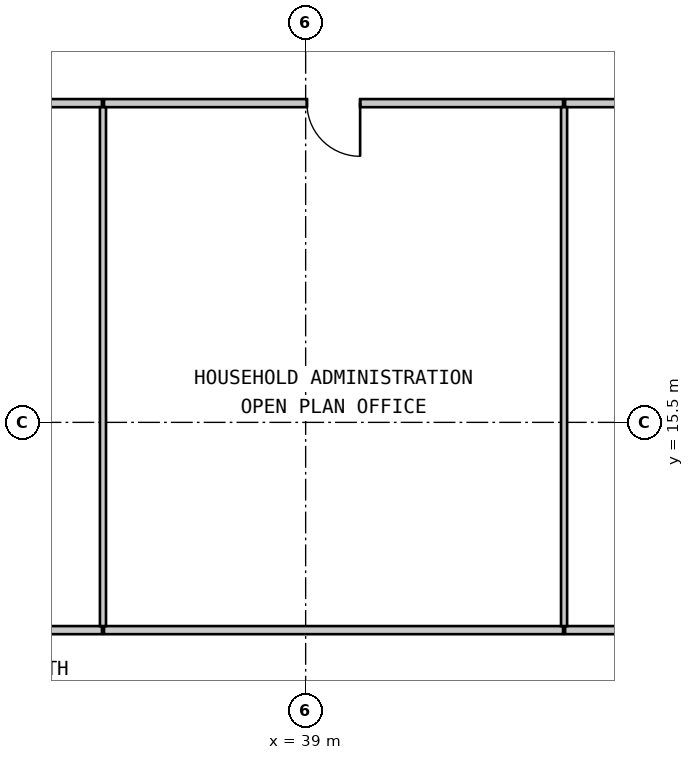
"""IFC4 building model, lengths in metres.
Left out: names, types, materials, properties, quantities, classifications, styles, units other than length and angle.
Written with IfcOpenShell. Run it as: python <this file> out.ifc"""

import sys

from ifc_helpers import new_model, si_unit, direction, frame, frame_2d, origin, place, context, subcontext, project, spatial, rectangle, extrude, source, transform, mapped, element, fill, save


model = new_model("IFC4")
c1 = context("Model", 3, precision=1e-05, world=origin(), true_north=direction((0.0, 1.0)))
c2 = subcontext(c1, "Body", "Model", "MODEL_VIEW")
j1 = project(units=[si_unit("LENGTHUNIT", "METRE"), si_unit("PLANEANGLEUNIT", "RADIAN")], contexts=[c1])
p1 = place(None, origin())
s1 = spatial("IfcSite", under=j1, at=p1, CompositionType="ELEMENT")
p2 = place(p1, origin())
s2 = spatial("IfcBuilding", under=s1, at=p2, CompositionType="ELEMENT")
p3 = place(p2, frame((0.0, 0.0, 68.25)))
s3 = spatial("IfcBuildingStorey", under=s2, at=p3, CompositionType="ELEMENT", Elevation=68.25)
m1 = source(origin(), c2, "Body", "SweptSolid", [
    extrude(rectangle(XDim=9.06, YDim=0.16, at=frame_2d((4.53, 0.0))), origin(), (0.0, 0.0, 1.0), 2.93),
])
p4 = place(p3, frame((34.98, 21.8, 0.0), z_axis=(0.0, 0.0, 1.0), x_axis=(-1.0, 0.0, 0.0)))
e1 = element("IfcWall", 1, at=p4, inside=s3, PredefinedType="PARTITIONING", context=c2, shape_type="MappedRepresentation", body=[
    mapped(m1, transform((0.0, 0.0, 0.0), scale=1.0)),
])
m2 = source(origin(), c2, "Body", "SweptSolid", [
    extrude(rectangle(XDim=1.05, YDim=2.1, at=frame_2d((0.525, 1.05))), frame((0.0, 0.09, 0.0), z_axis=(0.0, -1.0, 0.0), x_axis=(1.0, 0.0, 0.0)), (0.0, 0.0, 1.0), 0.18),
])
p5 = place(p4, frame((4.005, 0.0, 0.0)))
e2 = element("IfcOpeningElement", 2, at=p5, cuts=e1, PredefinedType="OPENING", context=c2, shape_type="MappedRepresentation", body=[
    mapped(m2, transform((0.0, 0.0, 0.0), scale=1.0)),
])
p6 = place(p3, frame((44.08, 21.8, 0.0), z_axis=(0.0, 0.0, 1.0), x_axis=(-1.0, 0.0, 0.0)))
e3 = element("IfcWall", 3, at=p6, inside=s3, PredefinedType="PARTITIONING", context=c2, shape_type="MappedRepresentation", body=[
    mapped(m1, transform((0.0, 0.0, 0.0), scale=1.0)),
])
p7 = place(p6, frame((4.005, 0.0, 0.0)))
e4 = element("IfcOpeningElement", 4, at=p7, cuts=e3, PredefinedType="OPENING", context=c2, shape_type="MappedRepresentation", body=[
    mapped(m2, transform((0.0, 0.0, 0.0), scale=1.0)),
])
for number, where, z_axis, x_axis in (
    (5, (53.18, 21.8, 0.0), (0.0, 0.0, 1.0), (-1.0, 0.0, 0.0)),
    (6, (25.92, 11.4, 0.0), (0.0, 0.0, 1.0), (1.0, 0.0, 0.0)),
    (7, (35.02, 11.4, 0.0), (0.0, 0.0, 1.0), (1.0, 0.0, 0.0)),
):
    element("IfcWall", number, at=place(p3, frame(where, z_axis=z_axis, x_axis=x_axis)), inside=s3, PredefinedType="PARTITIONING", context=c2, shape_type="MappedRepresentation", body=[
        mapped(m1, transform((0.0, 0.0, 0.0), scale=1.0)),
    ])
m3 = source(origin(), c2, "Body", "SweptSolid", [
    extrude(rectangle(XDim=9.0, YDim=0.16, at=frame_2d((4.5, 0.0))), origin(), (0.0, 0.0, 1.0), 2.93),
])
p8 = place(p3, frame((44.12, 11.4, 0.0), z_axis=(0.0, 0.0, 1.0), x_axis=(1.0, 0.0, 0.0)))
e8 = element("IfcWall", 8, at=p8, inside=s3, PredefinedType="PARTITIONING", context=c2, shape_type="MappedRepresentation", body=[
    mapped(m3, transform((0.0, 0.0, 0.0), scale=1.0)),
])
m4 = source(origin(), c2, "Body", "SweptSolid", [
    extrude(rectangle(XDim=10.24, YDim=0.12, at=frame_2d((5.12, 0.0))), origin(), (0.0, 0.0, 1.0), 2.93),
])
for number, where, z_axis, x_axis in (
    (9, (35.0, 21.72, 0.0), (0.0, 0.0, 1.0), (0.0, -1.0, 0.0)),
    (10, (44.1, 21.72, 0.0), (0.0, 0.0, 1.0), (0.0, -1.0, 0.0)),
):
    element("IfcWall", number, at=place(p3, frame(where, z_axis=z_axis, x_axis=x_axis)), inside=s3, PredefinedType="PARTITIONING", context=c2, shape_type="MappedRepresentation", body=[
        mapped(m4, transform((0.0, 0.0, 0.0), scale=1.0)),
    ])
m5 = source(origin(), c2, "Body", "SweptSolid", [
    extrude(rectangle(XDim=1.05, YDim=2.1, at=frame_2d((0.525, 1.05))), frame((0.0, 0.025, 0.0), z_axis=(0.0, -1.0, 0.0), x_axis=(1.0, 0.0, 0.0)), (0.0, 0.0, 1.0), 0.05),
])
p9 = place(p7, origin())
e11 = element("IfcDoor", 11, at=p9, inside=s3, OperationType="SINGLE_SWING_LEFT", PredefinedType="DOOR", context=c2, shape_type="MappedRepresentation", body=[
    mapped(m5, transform((0.0, 0.0, 0.0), scale=1.0)),
])
fill(e4, e11)
save(model, sys.argv[1])
